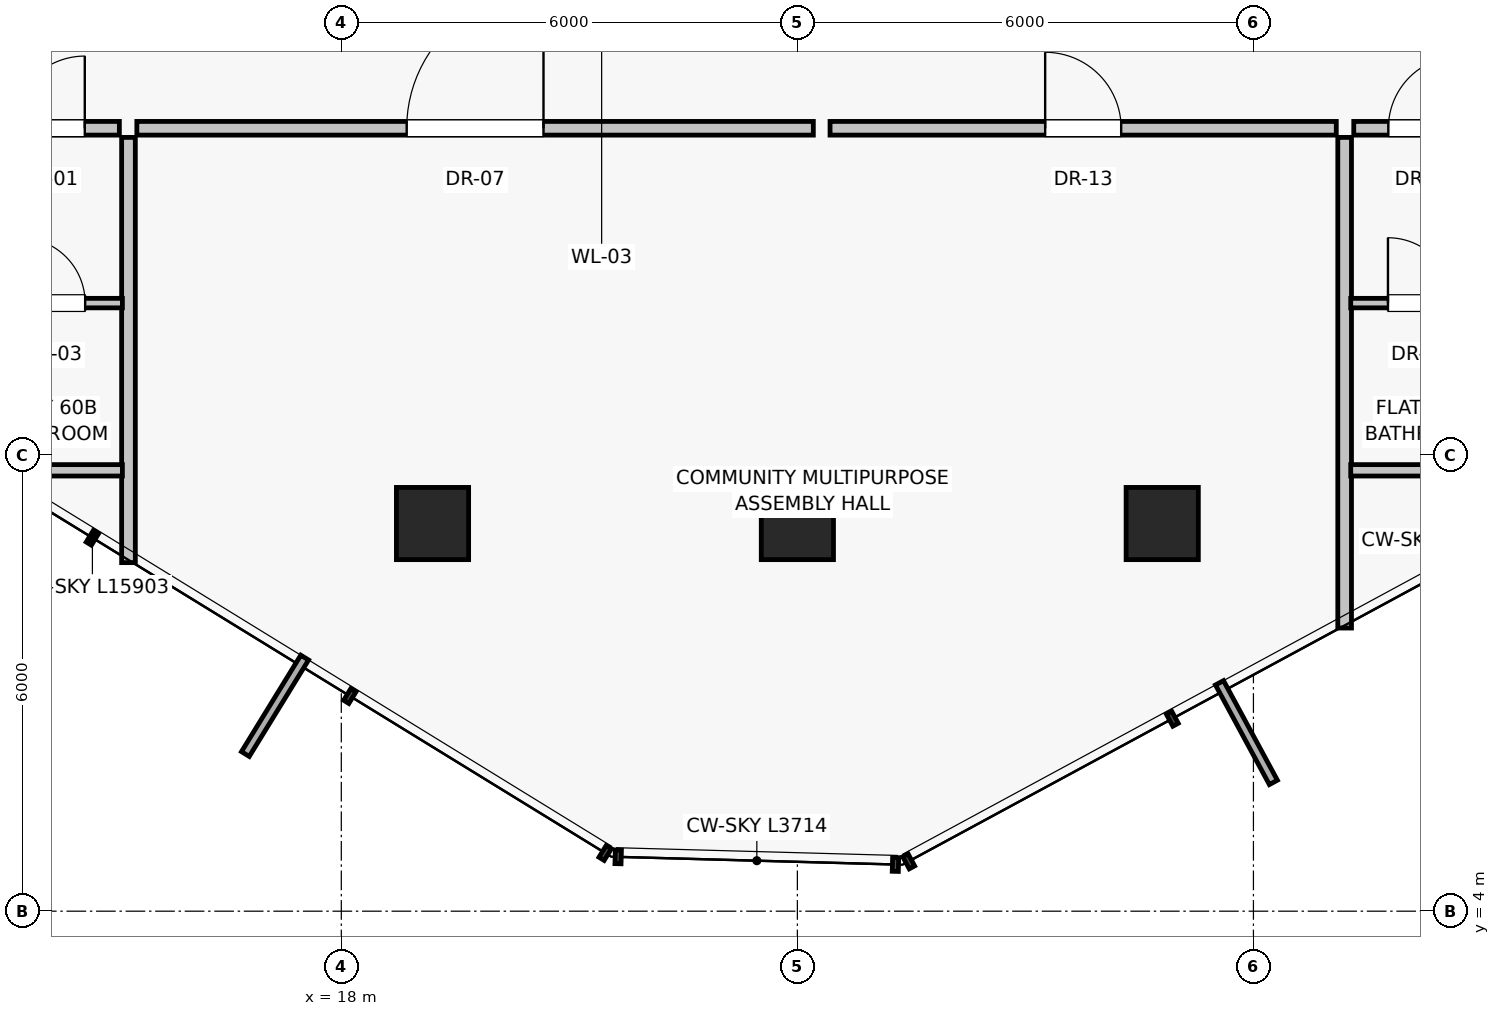
"""IFC4 building model, lengths in metres.
Left out: names, types, materials, properties, quantities, classifications, styles, units other than length and angle.
Written with IfcOpenShell. Run it as: python <this file> out.ifc"""

import sys

from ifc_helpers import new_model, si_unit, direction, frame, frame_2d, origin, origin_2d, place, context, subcontext, project, spatial, rectangle, extrude, source, transform, mapped, element, fill, save


model = new_model("IFC4")
c1 = context("Model", 3, precision=1e-05, world=origin(), true_north=direction((0.0, 1.0)))
c2 = subcontext(c1, "Body", "Model", "MODEL_VIEW")
j1 = project(units=[si_unit("LENGTHUNIT", "METRE"), si_unit("PLANEANGLEUNIT", "RADIAN")], contexts=[c1])
p1 = place(None, origin())
s1 = spatial("IfcSite", under=j1, at=p1, CompositionType="ELEMENT")
p2 = place(p1, origin())
s2 = spatial("IfcBuilding", under=s1, at=p2, CompositionType="ELEMENT")
p3 = place(p2, frame((0.0, 0.0, 211.35)))
s3 = spatial("IfcBuildingStorey", under=s2, at=p3, CompositionType="ELEMENT", Elevation=211.35)
for number, where, z_axis, x_axis in (
    (1, (19.2, 9.1, 0.0), (0.0, 0.0, 1.0), (1.0, 0.0, 0.0)),
    (2, (24.0, 9.1, 0.0), (0.0, 0.0, 1.0), (1.0, 0.0, 0.0)),
    (3, (28.8, 9.1, 0.0), (0.0, 0.0, 1.0), (1.0, 0.0, 0.0)),
):
    element("IfcColumn", number, at=place(p3, frame(where, z_axis=z_axis, x_axis=x_axis)), inside=s3, PredefinedType="COLUMN", context=c2, shape_type="SweptSolid", body=[
        extrude(rectangle(XDim=0.95, YDim=0.95, at=origin_2d()), origin(), (0.0, 0.0, 1.0), 4.3),
    ])
p4 = place(p3, frame((15.2, 14.18, 0.0), z_axis=(0.0, 0.0, 1.0), x_axis=(0.0, -1.0, 0.0)))
e4 = element("IfcWall", 4, at=p4, inside=s3, PredefinedType="PARTITIONING", context=c2, shape_type="SweptSolid", body=[
    extrude(rectangle(XDim=5.594, YDim=0.18, at=frame_2d((2.797, 0.0))), origin(), (0.0, 0.0, 1.0), 4.065),
])
p5 = place(p3, frame((31.2, 14.18, 0.0), z_axis=(0.0, 0.0, 1.0), x_axis=(0.0, -1.0, 0.0)))
e5 = element("IfcWall", 5, at=p5, inside=s3, PredefinedType="PARTITIONING", context=c2, shape_type="SweptSolid", body=[
    extrude(rectangle(XDim=6.455, YDim=0.18, at=frame_2d((3.228, 0.0))), origin(), (0.0, 0.0, 1.0), 4.065),
])
p6 = place(p3, frame((15.31, 14.3, 0.0), z_axis=(0.0, 0.0, 1.0), x_axis=(1.0, 0.0, 0.0)))
e6 = element("IfcWall", 6, at=p6, inside=s3, PredefinedType="PARTITIONING", context=c2, shape_type="SweptSolid", body=[
    extrude(rectangle(XDim=8.9, YDim=0.18, at=frame_2d((4.45, 0.0))), origin(), (0.0, 0.0, 1.0), 4.065),
])
p7 = place(p6, frame((3.55, 0.0, 0.0)))
e7 = element("IfcOpeningElement", 7, at=p7, cuts=e6, PredefinedType="OPENING", context=c2, shape_type="SweptSolid", body=[
    extrude(rectangle(XDim=1.8, YDim=2.25, at=frame_2d((0.9, 1.125))), frame((0.0, 0.1, 0.0), z_axis=(0.0, -1.0, 0.0), x_axis=(1.0, 0.0, 0.0)), (0.0, 0.0, 1.0), 0.2),
])
p8 = place(p3, frame((24.43, 14.3, 0.0), z_axis=(0.0, 0.0, 1.0), x_axis=(1.0, 0.0, 0.0)))
e8 = element("IfcWall", 8, at=p8, inside=s3, PredefinedType="PARTITIONING", context=c2, shape_type="SweptSolid", body=[
    extrude(rectangle(XDim=6.66, YDim=0.18, at=frame_2d((3.33, 0.0))), origin(), (0.0, 0.0, 1.0), 4.065),
])
p9 = place(p8, frame((2.83, 0.0, 0.0)))
e9 = element("IfcOpeningElement", 9, at=p9, cuts=e8, PredefinedType="OPENING", context=c2, shape_type="SweptSolid", body=[
    extrude(rectangle(XDim=1.0, YDim=2.01, at=frame_2d((0.5, 1.005))), frame((0.0, 0.1, 0.0), z_axis=(0.0, -1.0, 0.0), x_axis=(1.0, 0.0, 0.0)), (0.0, 0.0, 1.0), 0.2),
])
p10 = place(p3, frame((13.22, 14.3, 0.0), z_axis=(0.0, 0.0, 1.0), x_axis=(1.0, 0.0, 0.0)))
e10 = element("IfcWall", 10, at=p10, inside=s3, PredefinedType="PARTITIONING", context=c2, shape_type="SweptSolid", body=[
    extrude(rectangle(XDim=1.86, YDim=0.18, at=frame_2d((0.93, 0.0))), origin(), (0.0, 0.0, 1.0), 4.065),
])
p11 = place(p10, frame((0.455, 0.0, 0.0)))
e11 = element("IfcOpeningElement", 11, at=p11, cuts=e10, PredefinedType="OPENING", context=c2, shape_type="SweptSolid", body=[
    extrude(rectangle(XDim=0.95, YDim=2.02, at=frame_2d((0.475, 1.01))), frame((0.0, 0.1, 0.0), z_axis=(0.0, -1.0, 0.0), x_axis=(1.0, 0.0, 0.0)), (0.0, 0.0, 1.0), 0.2),
])
p12 = place(p3, frame((13.28, 12.0, 0.0), z_axis=(0.0, 0.0, 1.0), x_axis=(1.0, 0.0, 0.0)))
e12 = element("IfcWall", 12, at=p12, inside=s3, PredefinedType="PARTITIONING", context=c2, shape_type="SweptSolid", body=[
    extrude(rectangle(XDim=1.84, YDim=0.125, at=frame_2d((0.92, 0.0))), origin(), (0.0, 0.0, 1.0), 4.065),
])
p13 = place(p12, frame((0.49, 0.0, 0.0)))
e13 = element("IfcOpeningElement", 13, at=p13, cuts=e12, PredefinedType="OPENING", context=c2, shape_type="SweptSolid", body=[
    extrude(rectangle(XDim=0.86, YDim=2.01, at=frame_2d((0.43, 1.005))), frame((0.0, 0.073, 0.0), z_axis=(0.0, -1.0, 0.0), x_axis=(1.0, 0.0, 0.0)), (0.0, 0.0, 1.0), 0.145),
])
p14 = place(p3, frame((13.28, 9.8, 0.0), z_axis=(0.0, 0.0, 1.0), x_axis=(1.0, 0.0, 0.0)))
e14 = element("IfcWall", 14, at=p14, inside=s3, PredefinedType="PARTITIONING", context=c2, shape_type="SweptSolid", body=[
    extrude(rectangle(XDim=1.84, YDim=0.15, at=frame_2d((0.92, 0.0))), origin(), (0.0, 0.0, 1.0), 4.065),
])
p15 = place(p3, frame((31.32, 14.3, 0.0), z_axis=(0.0, 0.0, 1.0), x_axis=(1.0, 0.0, 0.0)))
e15 = element("IfcWall", 15, at=p15, inside=s3, PredefinedType="PARTITIONING", context=c2, shape_type="SweptSolid", body=[
    extrude(rectangle(XDim=1.86, YDim=0.18, at=frame_2d((0.93, 0.0))), origin(), (0.0, 0.0, 1.0), 4.065),
])
p16 = place(p15, frame((0.455, 0.0, 0.0)))
e16 = element("IfcOpeningElement", 16, at=p16, cuts=e15, PredefinedType="OPENING", context=c2, shape_type="SweptSolid", body=[
    extrude(rectangle(XDim=0.95, YDim=2.02, at=frame_2d((0.475, 1.01))), frame((0.0, 0.1, 0.0), z_axis=(0.0, -1.0, 0.0), x_axis=(1.0, 0.0, 0.0)), (0.0, 0.0, 1.0), 0.2),
])
p17 = place(p3, frame((31.28, 12.0, 0.0), z_axis=(0.0, 0.0, 1.0), x_axis=(1.0, 0.0, 0.0)))
e17 = element("IfcWall", 17, at=p17, inside=s3, PredefinedType="PARTITIONING", context=c2, shape_type="SweptSolid", body=[
    extrude(rectangle(XDim=1.84, YDim=0.125, at=frame_2d((0.92, 0.0))), origin(), (0.0, 0.0, 1.0), 4.065),
])
p18 = place(p17, frame((0.49, 0.0, 0.0)))
e18 = element("IfcOpeningElement", 18, at=p18, cuts=e17, PredefinedType="OPENING", context=c2, shape_type="SweptSolid", body=[
    extrude(rectangle(XDim=0.86, YDim=2.01, at=frame_2d((0.43, 1.005))), frame((0.0, 0.073, 0.0), z_axis=(0.0, -1.0, 0.0), x_axis=(1.0, 0.0, 0.0)), (0.0, 0.0, 1.0), 0.145),
])
p19 = place(p3, frame((31.28, 9.8, 0.0), z_axis=(0.0, 0.0, 1.0), x_axis=(1.0, 0.0, 0.0)))
e19 = element("IfcWall", 19, at=p19, inside=s3, PredefinedType="PARTITIONING", context=c2, shape_type="SweptSolid", body=[
    extrude(rectangle(XDim=1.84, YDim=0.15, at=frame_2d((0.92, 0.0))), origin(), (0.0, 0.0, 1.0), 4.065),
])
m1 = source(origin(), c2, "Body", "SweptSolid", [
    extrude(rectangle(XDim=1.8, YDim=2.25, at=frame_2d((0.9, 1.125))), frame((0.0, 0.025, 0.0), z_axis=(0.0, -1.0, 0.0), x_axis=(1.0, 0.0, 0.0)), (0.0, 0.0, 1.0), 0.05),
])
p20 = place(p7, origin())
e20 = element("IfcDoor", 20, at=p20, inside=s3, OperationType="SINGLE_SWING_RIGHT", PredefinedType="DOOR", context=c2, shape_type="MappedRepresentation", body=[
    mapped(m1, transform((0.0, 0.0, 0.0), scale=1.0)),
])
fill(e7, e20)
m2 = source(origin(), c2, "Body", "SweptSolid", [
    extrude(rectangle(XDim=1.0, YDim=2.01, at=frame_2d((0.5, 1.005))), frame((0.0, 0.025, 0.0), z_axis=(0.0, -1.0, 0.0), x_axis=(1.0, 0.0, 0.0)), (0.0, 0.0, 1.0), 0.05),
])
p21 = place(p9, origin())
e21 = element("IfcDoor", 21, at=p21, inside=s3, OperationType="SINGLE_SWING_LEFT", PredefinedType="DOOR", context=c2, shape_type="MappedRepresentation", body=[
    mapped(m2, transform((0.0, 0.0, 0.0), scale=1.0)),
])
fill(e9, e21)
m3 = source(origin(), c2, "Body", "SweptSolid", [
    extrude(rectangle(XDim=0.95, YDim=2.02, at=frame_2d((0.475, 1.01))), frame((0.0, 0.025, 0.0), z_axis=(0.0, -1.0, 0.0), x_axis=(1.0, 0.0, 0.0)), (0.0, 0.0, 1.0), 0.05),
])
p22 = place(p11, origin())
e22 = element("IfcDoor", 22, at=p22, inside=s3, OperationType="SINGLE_SWING_RIGHT", PredefinedType="DOOR", context=c2, shape_type="MappedRepresentation", body=[
    mapped(m3, transform((0.0, 0.0, 0.0), scale=1.0)),
])
fill(e11, e22)
m4 = source(origin(), c2, "Body", "SweptSolid", [
    extrude(rectangle(XDim=0.86, YDim=2.01, at=frame_2d((0.43, 1.005))), frame((0.0, 0.025, 0.0), z_axis=(0.0, -1.0, 0.0), x_axis=(1.0, 0.0, 0.0)), (0.0, 0.0, 1.0), 0.05),
])
p23 = place(p13, origin())
e23 = element("IfcDoor", 23, at=p23, inside=s3, OperationType="SINGLE_SWING_LEFT", PredefinedType="DOOR", context=c2, shape_type="MappedRepresentation", body=[
    mapped(m4, transform((0.0, 0.0, 0.0), scale=1.0)),
])
fill(e13, e23)
p24 = place(p16, origin())
e24 = element("IfcDoor", 24, at=p24, inside=s3, OperationType="SINGLE_SWING_RIGHT", PredefinedType="DOOR", context=c2, shape_type="MappedRepresentation", body=[
    mapped(m3, transform((0.0, 0.0, 0.0), scale=1.0)),
])
fill(e16, e24)
p25 = place(p18, origin())
e25 = element("IfcDoor", 25, at=p25, inside=s3, OperationType="SINGLE_SWING_LEFT", PredefinedType="DOOR", context=c2, shape_type="MappedRepresentation", body=[
    mapped(m4, transform((0.0, 0.0, 0.0), scale=1.0)),
])
fill(e18, e25)
save(model, sys.argv[1])
